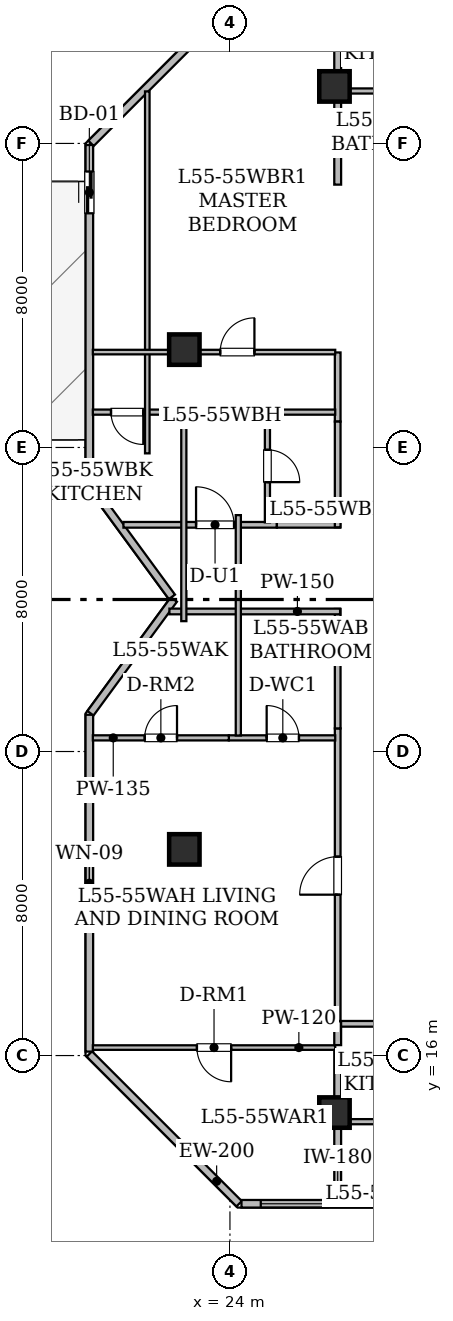
"""IFC4 building model, lengths in metres.
Left out: names, types, materials, properties, quantities, classifications, styles, units other than length and angle.
Written with IfcOpenShell. Run it as: python <this file> out.ifc"""

import sys

from ifc_helpers import new_model, si_unit, direction, frame, frame_2d, origin, origin_2d, place, context, subcontext, project, spatial, rectangle, hollow_rectangle, extrude, element, fill, save


model = new_model("IFC4")
c1 = context("Model", 3, precision=1e-05, world=origin(), true_north=direction((0.0, 1.0)))
c2 = subcontext(c1, "Body", "Model", "MODEL_VIEW")
j1 = project(units=[si_unit("LENGTHUNIT", "METRE"), si_unit("PLANEANGLEUNIT", "RADIAN")], contexts=[c1])
p1 = place(None, origin())
s1 = spatial("IfcSite", under=j1, at=p1, CompositionType="ELEMENT")
p2 = place(p1, origin())
s2 = spatial("IfcBuilding", under=s1, at=p2, CompositionType="ELEMENT")
p3 = place(p2, frame((0.0, 0.0, 217.2)))
s3 = spatial("IfcBuildingStorey", under=s2, at=p3, CompositionType="ELEMENT", Elevation=217.2)
for number, where, z_axis, x_axis in (
    (1, (26.75, 14.5, 0.025), (0.0, 0.0, 1.0), (1.0, 0.0, 0.0)),
    (2, (26.75, 41.5, 0.025), (0.0, 0.0, 1.0), (1.0, 0.0, 0.0)),
    (3, (22.8, 21.425, 0.025), (0.0, 0.0, 1.0), (1.0, 0.0, 0.0)),
    (4, (22.8, 34.575, 0.025), (0.0, 0.0, 1.0), (1.0, 0.0, 0.0)),
):
    element("IfcColumn", number, at=place(p3, frame(where, z_axis=z_axis, x_axis=x_axis)), inside=s3, PredefinedType="COLUMN", context=c2, shape_type="SweptSolid", body=[
        extrude(hollow_rectangle(XDim=0.8, YDim=0.8, WallThickness=0.04, at=origin_2d()), origin(), (0.0, 0.0, 1.0), 3.625),
    ])
p4 = place(p3, frame((24.241, 12.1, 0.0), z_axis=(0.0, 0.0, 1.0), x_axis=(-0.707106781187, 0.707106781187, 0.0)))
e5 = element("IfcWall", 5, at=p4, inside=s3, PredefinedType="STANDARD", context=c2, shape_type="SweptSolid", body=[
    extrude(rectangle(XDim=5.573, YDim=0.2, at=frame_2d((2.787, 0.0))), origin(), (0.0, 0.0, 1.0), 3.43),
])
p5 = place(p3, frame((20.3, 16.104, 0.0), z_axis=(0.0, 0.0, 1.0), x_axis=(0.0, 1.0, 0.0)))
e6 = element("IfcWall", 6, at=p5, inside=s3, PredefinedType="STANDARD", context=c2, shape_type="SweptSolid", body=[
    extrude(rectangle(XDim=8.863, YDim=0.2, at=frame_2d((4.432, 0.0))), origin(), (0.0, 0.0, 1.0), 3.43),
])
p6 = place(p5, frame((3.531, 0.0, 0.85)))
e7 = element("IfcOpeningElement", 7, at=p6, cuts=e6, PredefinedType="OPENING", context=c2, shape_type="SweptSolid", body=[
    extrude(rectangle(XDim=1.8, YDim=0.92, at=frame_2d((0.9, 0.46))), frame((0.0, 0.11, 0.0), z_axis=(0.0, -1.0, 0.0), x_axis=(1.0, 0.0, 0.0)), (0.0, 0.0, 1.0), 0.22),
])
p7 = place(p3, frame((20.329, 25.007, 0.0), z_axis=(0.0, 0.0, 1.0), x_axis=(0.591366515379, 0.806402904564, 0.0)))
e8 = element("IfcWall", 8, at=p7, inside=s3, PredefinedType="STANDARD", context=c2, shape_type="SweptSolid", body=[
    extrude(rectangle(XDim=3.711, YDim=0.2, at=frame_2d((1.856, 0.0))), origin(), (0.0, 0.0, 1.0), 3.43),
])
p8 = place(p3, frame((22.473, 28.069, 0.0), z_axis=(0.0, 0.0, 1.0), x_axis=(-0.591248456881, 0.80648946815, 0.0)))
e9 = element("IfcWall", 9, at=p8, inside=s3, PredefinedType="STANDARD", context=c2, shape_type="SweptSolid", body=[
    extrude(rectangle(XDim=3.675, YDim=0.2, at=frame_2d((1.837, 0.0))), origin(), (0.0, 0.0, 1.0), 3.43),
])
p9 = place(p3, frame((20.3, 31.084, 0.0), z_axis=(0.0, 0.0, 1.0), x_axis=(0.0, 1.0, 0.0)))
e10 = element("IfcWall", 10, at=p9, inside=s3, PredefinedType="STANDARD", context=c2, shape_type="SweptSolid", body=[
    extrude(rectangle(XDim=8.875, YDim=0.2, at=frame_2d((4.438, 0.0))), origin(), (0.0, 0.0, 1.0), 3.43),
])
p10 = place(p9, frame((7.077, 0.0, 0.0)))
e11 = element("IfcOpeningElement", 11, at=p10, cuts=e10, PredefinedType="OPENING", context=c2, shape_type="SweptSolid", body=[
    extrude(rectangle(XDim=1.1, YDim=2.2, at=frame_2d((0.55, 1.1))), frame((0.0, 0.11, 0.0), z_axis=(0.0, -1.0, 0.0), x_axis=(1.0, 0.0, 0.0)), (0.0, 0.0, 1.0), 0.22),
])
p11 = place(p3, frame((20.344, 40.003, 0.0), z_axis=(0.0, 0.0, 1.0), x_axis=(0.707106781187, 0.707106781187, 0.0)))
e12 = element("IfcWall", 12, at=p11, inside=s3, PredefinedType="STANDARD", context=c2, shape_type="SweptSolid", body=[
    extrude(rectangle(XDim=5.511, YDim=0.2, at=frame_2d((2.756, 0.0))), origin(), (0.0, 0.0, 1.0), 3.43),
])
p12 = place(p3, frame((65.696, 12.1, 0.0), z_axis=(0.0, 0.0, 1.0), x_axis=(-1.0, 0.0, 0.0)))
e13 = element("IfcWall", 13, at=p12, inside=s3, PredefinedType="STANDARD", context=c2, shape_type="SweptSolid", body=[
    extrude(rectangle(XDim=41.393, YDim=0.2, at=frame_2d((20.697, 0.0))), origin(), (0.0, 0.0, 1.0), 3.43),
])
p13 = place(p12, frame((39.085, 0.0, 0.85)))
e14 = element("IfcOpeningElement", 14, at=p13, cuts=e13, PredefinedType="OPENING", context=c2, shape_type="SweptSolid", body=[
    extrude(rectangle(XDim=1.8, YDim=0.92, at=frame_2d((0.9, 0.46))), frame((0.0, 0.11, 0.0), z_axis=(0.0, -1.0, 0.0), x_axis=(1.0, 0.0, 0.0)), (0.0, 0.0, 1.0), 0.22),
])
p14 = place(p12, frame((30.571, 0.0, 0.85)))
e15 = element("IfcOpeningElement", 15, at=p14, cuts=e13, PredefinedType="OPENING", context=c2, shape_type="SweptSolid", body=[
    extrude(rectangle(XDim=1.8, YDim=0.92, at=frame_2d((0.9, 0.46))), frame((0.0, 0.11, 0.0), z_axis=(0.0, -1.0, 0.0), x_axis=(1.0, 0.0, 0.0)), (0.0, 0.0, 1.0), 0.22),
])
p15 = place(p12, frame((25.264, 0.0, 0.85)))
e16 = element("IfcOpeningElement", 16, at=p15, cuts=e13, PredefinedType="OPENING", context=c2, shape_type="SweptSolid", body=[
    extrude(rectangle(XDim=1.8, YDim=0.92, at=frame_2d((0.9, 0.46))), frame((0.0, 0.11, 0.0), z_axis=(0.0, -1.0, 0.0), x_axis=(1.0, 0.0, 0.0)), (0.0, 0.0, 1.0), 0.22),
])
p16 = place(p12, frame((16.538, 0.0, 0.85)))
e17 = element("IfcOpeningElement", 17, at=p16, cuts=e13, PredefinedType="OPENING", context=c2, shape_type="SweptSolid", body=[
    extrude(rectangle(XDim=1.8, YDim=0.92, at=frame_2d((0.9, 0.46))), frame((0.0, 0.11, 0.0), z_axis=(0.0, -1.0, 0.0), x_axis=(1.0, 0.0, 0.0)), (0.0, 0.0, 1.0), 0.22),
])
p17 = place(p12, frame((4.105, 0.0, 0.85)))
e18 = element("IfcOpeningElement", 18, at=p17, cuts=e13, PredefinedType="OPENING", context=c2, shape_type="SweptSolid", body=[
    extrude(rectangle(XDim=1.8, YDim=0.92, at=frame_2d((0.9, 0.46))), frame((0.0, 0.11, 0.0), z_axis=(0.0, -1.0, 0.0), x_axis=(1.0, 0.0, 0.0)), (0.0, 0.0, 1.0), 0.22),
])
p18 = place(p3, frame((26.835, 16.9, 0.0), z_axis=(0.0, 0.0, 1.0), x_axis=(0.0, 1.0, 0.0)))
e19 = element("IfcWall", 19, at=p18, inside=s3, PredefinedType="STANDARD", context=c2, shape_type="SweptSolid", body=[
    extrude(rectangle(XDim=7.708, YDim=0.15, at=frame_2d((3.854, 0.0))), origin(), (0.0, 0.0, 1.0), 2.725),
])
p19 = place(p18, frame((3.333, 0.0, 0.0)))
e20 = element("IfcOpeningElement", 20, at=p19, cuts=e19, PredefinedType="OPENING", context=c2, shape_type="SweptSolid", body=[
    extrude(rectangle(XDim=1.0, YDim=2.15, at=frame_2d((0.5, 1.075))), frame((0.0, 0.085, 0.0), z_axis=(0.0, -1.0, 0.0), x_axis=(1.0, 0.0, 0.0)), (0.0, 0.0, 1.0), 0.17),
])
p20 = place(p3, frame((26.835, 24.608, 0.0), z_axis=(0.0, 0.0, 1.0), x_axis=(0.0, 1.0, 0.0)))
e21 = element("IfcWall", 21, at=p20, inside=s3, PredefinedType="STANDARD", context=c2, shape_type="SweptSolid", body=[
    extrude(rectangle(XDim=3.142, YDim=0.15, at=frame_2d((1.571, 0.0))), origin(), (0.0, 0.0, 1.0), 3.43),
])
p21 = place(p3, frame((26.898, 27.685, 0.0), z_axis=(0.0, 0.0, 1.0), x_axis=(-1.0, 0.0, 0.0)))
e22 = element("IfcWall", 22, at=p21, inside=s3, PredefinedType="STANDARD", context=c2, shape_type="SweptSolid", body=[
    extrude(rectangle(XDim=4.491, YDim=0.15, at=frame_2d((2.246, 0.0))), origin(), (0.0, 0.0, 1.0), 2.887),
])
p22 = place(p3, frame((21.197, 29.965, 0.0), z_axis=(0.0, 0.0, 1.0), x_axis=(1.0, 0.0, 0.0)))
e23 = element("IfcWall", 23, at=p22, inside=s3, PredefinedType="STANDARD", context=c2, shape_type="SweptSolid", body=[
    extrude(rectangle(XDim=4.038, YDim=0.15, at=frame_2d((2.019, 0.0))), origin(), (0.0, 0.0, 1.0), 2.887),
])
p23 = place(p22, frame((1.911, 0.0, 0.0)))
e24 = element("IfcOpeningElement", 24, at=p23, cuts=e23, PredefinedType="OPENING", context=c2, shape_type="SweptSolid", body=[
    extrude(rectangle(XDim=1.0, YDim=2.15, at=frame_2d((0.5, 1.075))), frame((0.0, 0.085, 0.0), z_axis=(0.0, -1.0, 0.0), x_axis=(1.0, 0.0, 0.0)), (0.0, 0.0, 1.0), 0.17),
])
p24 = place(p3, frame((26.835, 32.681, 0.0), z_axis=(0.0, 0.0, 1.0), x_axis=(0.0, 1.0, 0.0)))
e25 = element("IfcWall", 25, at=p24, inside=s3, PredefinedType="STANDARD", context=c2, shape_type="SweptSolid", body=[
    extrude(rectangle(XDim=1.819, YDim=0.15, at=frame_2d((0.91, 0.0))), origin(), (0.0, 0.0, 1.0), 3.065),
])
p25 = place(p3, frame((25.235, 29.965, 0.0), z_axis=(0.0, 0.0, 1.0), x_axis=(1.0, 0.0, 0.0)))
e26 = element("IfcWall", 26, at=p25, inside=s3, PredefinedType="STANDARD", context=c2, shape_type="SweptSolid", body=[
    extrude(rectangle(XDim=1.665, YDim=0.15, at=frame_2d((0.833, 0.0))), origin(), (0.0, 0.0, 1.0), 3.43),
])
p26 = place(p3, frame((26.835, 29.9, 0.0), z_axis=(0.0, 0.0, 1.0), x_axis=(0.0, 1.0, 0.0)))
e27 = element("IfcWall", 27, at=p26, inside=s3, PredefinedType="STANDARD", context=c2, shape_type="SweptSolid", body=[
    extrude(rectangle(XDim=2.781, YDim=0.15, at=frame_2d((1.391, 0.0))), origin(), (0.0, 0.0, 1.0), 3.43),
])
p27 = place(p3, frame((30.751, 16.835, 0.0), z_axis=(0.0, 0.0, 1.0), x_axis=(-1.0, 0.0, 0.0)))
e28 = element("IfcWall", 28, at=p27, inside=s3, PredefinedType="STANDARD", context=c2, shape_type="SweptSolid", body=[
    extrude(rectangle(XDim=3.851, YDim=0.15, at=frame_2d((1.926, 0.0))), origin(), (0.0, 0.0, 1.0), 2.725),
])
p28 = place(p3, frame((23.971, 24.359, 0.0), z_axis=(0.0, 0.0, 1.0), x_axis=(1.0, 0.0, 0.0)))
e29 = element("IfcWall", 29, at=p28, inside=s3, PredefinedType="PARTITIONING", context=c2, shape_type="SweptSolid", body=[
    extrude(rectangle(XDim=2.799, YDim=0.135, at=frame_2d((1.399, 0.0))), origin(), (0.0, 0.0, 1.0), 3.43),
])
p29 = place(p28, frame((0.995, 0.0, 0.0)))
e30 = element("IfcOpeningElement", 30, at=p29, cuts=e29, PredefinedType="OPENING", context=c2, shape_type="SweptSolid", body=[
    extrude(rectangle(XDim=0.85, YDim=2.1, at=frame_2d((0.425, 1.05))), frame((0.0, 0.077, 0.0), z_axis=(0.0, -1.0, 0.0), x_axis=(1.0, 0.0, 0.0)), (0.0, 0.0, 1.0), 0.155),
])
p30 = place(p3, frame((20.392, 24.359, 0.0), z_axis=(0.0, 0.0, 1.0), x_axis=(1.0, 0.0, 0.0)))
e31 = element("IfcWall", 31, at=p30, inside=s3, PredefinedType="PARTITIONING", context=c2, shape_type="SweptSolid", body=[
    extrude(rectangle(XDim=3.579, YDim=0.135, at=frame_2d((1.79, 0.0))), origin(), (0.0, 0.0, 1.0), 2.887),
])
p31 = place(p30, frame((1.365, 0.0, 0.0)))
e32 = element("IfcOpeningElement", 32, at=p31, cuts=e31, PredefinedType="OPENING", context=c2, shape_type="SweptSolid", body=[
    extrude(rectangle(XDim=0.85, YDim=2.1, at=frame_2d((0.425, 1.05))), frame((0.0, 0.077, 0.0), z_axis=(0.0, -1.0, 0.0), x_axis=(1.0, 0.0, 0.0)), (0.0, 0.0, 1.0), 0.155),
])
p32 = place(p3, frame((26.77, 16.21, 0.0), z_axis=(0.0, 0.0, 1.0), x_axis=(-1.0, 0.0, 0.0)))
e33 = element("IfcWall", 33, at=p32, inside=s3, PredefinedType="PARTITIONING", context=c2, shape_type="SweptSolid", body=[
    extrude(rectangle(XDim=6.378, YDim=0.12, at=frame_2d((3.189, 0.0))), origin(), (0.0, 0.0, 1.0), 2.887),
])
p33 = place(p32, frame((2.739, 0.0, 0.0)))
e34 = element("IfcOpeningElement", 34, at=p33, cuts=e33, PredefinedType="OPENING", context=c2, shape_type="SweptSolid", body=[
    extrude(rectangle(XDim=0.9, YDim=2.1, at=frame_2d((0.45, 1.05))), frame((0.0, 0.07, 0.0), z_axis=(0.0, -1.0, 0.0), x_axis=(1.0, 0.0, 0.0)), (0.0, 0.0, 1.0), 0.14),
])
p34 = place(p3, frame((26.835, 16.9, 0.0), z_axis=(0.0, 0.0, 1.0), x_axis=(0.0, -1.0, 0.0)))
e35 = element("IfcWall", 35, at=p34, inside=s3, PredefinedType="STANDARD", context=c2, shape_type="SweptSolid", body=[
    extrude(rectangle(XDim=0.625, YDim=0.18, at=frame_2d((0.312, 0.0))), origin(), (0.0, 0.0, 1.0), 3.43),
])
p35 = place(p3, frame((24.22, 24.421, 0.0), z_axis=(0.0, 0.0, 1.0), x_axis=(0.0, 1.0, 0.0)))
e36 = element("IfcWall", 36, at=p35, inside=s3, PredefinedType="PARTITIONING", context=c2, shape_type="SweptSolid", body=[
    extrude(rectangle(XDim=5.799, YDim=0.135, at=frame_2d((2.899, 0.0))), origin(), (0.0, 0.0, 1.0), 3.43),
])
p36 = place(p3, frame((26.835, 14.509, 0.0), z_axis=(0.0, 0.0, 1.0), x_axis=(0.0, -1.0, 0.0)))
e37 = element("IfcWall", 37, at=p36, inside=s3, PredefinedType="STANDARD", context=c2, shape_type="SweptSolid", body=[
    extrude(rectangle(XDim=2.317, YDim=0.18, at=frame_2d((1.159, 0.0))), origin(), (0.0, 0.0, 1.0), 2.725),
])
p37 = place(p3, frame((26.835, 16.145, 0.0), z_axis=(0.0, 0.0, 1.0), x_axis=(0.0, -1.0, 0.0)))
e38 = element("IfcWall", 38, at=p37, inside=s3, PredefinedType="STANDARD", context=c2, shape_type="SweptSolid", body=[
    extrude(rectangle(XDim=1.636, YDim=0.18, at=frame_2d((0.818, 0.0))), origin(), (0.0, 0.0, 1.0), 2.725),
])
p38 = place(p3, frame((26.77, 32.93, 0.0), z_axis=(0.0, 0.0, 1.0), x_axis=(-1.0, 0.0, 0.0)))
e39 = element("IfcWall", 39, at=p38, inside=s3, PredefinedType="PARTITIONING", context=c2, shape_type="SweptSolid", body=[
    extrude(rectangle(XDim=1.849, YDim=0.135, at=frame_2d((0.925, 0.0))), origin(), (0.0, 0.0, 1.0), 3.43),
])
p39 = place(p3, frame((24.986, 32.995, 0.0), z_axis=(0.0, 0.0, 1.0), x_axis=(0.0, -1.0, 0.0)))
e40 = element("IfcWall", 40, at=p39, inside=s3, PredefinedType="PARTITIONING", context=c2, shape_type="SweptSolid", body=[
    extrude(rectangle(XDim=2.965, YDim=0.135, at=frame_2d((1.482, 0.0))), origin(), (0.0, 0.0, 1.0), 3.43),
])
p40 = place(p39, frame((1.057, 0.0, 0.0)))
e41 = element("IfcOpeningElement", 41, at=p40, cuts=e40, PredefinedType="OPENING", context=c2, shape_type="SweptSolid", body=[
    extrude(rectangle(XDim=0.85, YDim=2.1, at=frame_2d((0.425, 1.05))), frame((0.0, 0.077, 0.0), z_axis=(0.0, -1.0, 0.0), x_axis=(1.0, 0.0, 0.0)), (0.0, 0.0, 1.0), 0.155),
])
p41 = place(p3, frame((22.786, 27.43, 0.0), z_axis=(0.0, 0.0, 1.0), x_axis=(0.0, 1.0, 0.0)))
e42 = element("IfcWall", 42, at=p41, inside=s3, PredefinedType="PARTITIONING", context=c2, shape_type="SweptSolid", body=[
    extrude(rectangle(XDim=5.565, YDim=0.135, at=frame_2d((2.783, 0.0))), origin(), (0.0, 0.0, 1.0), 2.887),
])
p42 = place(p3, frame((22.851, 32.93, 0.0), z_axis=(0.0, 0.0, 1.0), x_axis=(-1.0, 0.0, 0.0)))
e43 = element("IfcWall", 43, at=p42, inside=s3, PredefinedType="PARTITIONING", context=c2, shape_type="SweptSolid", body=[
    extrude(rectangle(XDim=2.459, YDim=0.135, at=frame_2d((1.229, 0.0))), origin(), (0.0, 0.0, 1.0), 2.887),
])
p43 = place(p42, frame((1.131, 0.0, 0.0)))
e44 = element("IfcOpeningElement", 44, at=p43, cuts=e43, PredefinedType="OPENING", context=c2, shape_type="SweptSolid", body=[
    extrude(rectangle(XDim=0.85, YDim=2.1, at=frame_2d((0.425, 1.05))), frame((0.0, 0.077, 0.0), z_axis=(0.0, -1.0, 0.0), x_axis=(1.0, 0.0, 0.0)), (0.0, 0.0, 1.0), 0.155),
])
p44 = place(p3, frame((21.825, 41.369, 0.0), z_axis=(0.0, 0.0, 1.0), x_axis=(0.0, -1.0, 0.0)))
e45 = element("IfcWall", 45, at=p44, inside=s3, PredefinedType="PARTITIONING", context=c2, shape_type="SweptSolid", body=[
    extrude(rectangle(XDim=9.524, YDim=0.12, at=frame_2d((4.762, 0.0))), origin(), (0.0, 0.0, 1.0), 3.43),
])
p45 = place(p3, frame((20.392, 34.51, 0.0), z_axis=(0.0, 0.0, 1.0), x_axis=(1.0, 0.0, 0.0)))
e46 = element("IfcWall", 46, at=p45, inside=s3, PredefinedType="PARTITIONING", context=c2, shape_type="SweptSolid", body=[
    extrude(rectangle(XDim=6.378, YDim=0.12, at=frame_2d((3.189, 0.0))), origin(), (0.0, 0.0, 1.0), 2.725),
])
p46 = place(p45, frame((3.352, 0.0, 0.0)))
e47 = element("IfcOpeningElement", 47, at=p46, cuts=e46, PredefinedType="OPENING", context=c2, shape_type="SweptSolid", body=[
    extrude(rectangle(XDim=0.9, YDim=2.1, at=frame_2d((0.45, 1.05))), frame((0.0, 0.07, 0.0), z_axis=(0.0, -1.0, 0.0), x_axis=(1.0, 0.0, 0.0)), (0.0, 0.0, 1.0), 0.14),
])
p47 = place(p3, frame((26.835, 41.629, 0.0), z_axis=(0.0, 0.0, 1.0), x_axis=(0.0, -1.0, 0.0)))
e48 = element("IfcWall", 48, at=p47, inside=s3, PredefinedType="STANDARD", context=c2, shape_type="SweptSolid", body=[
    extrude(rectangle(XDim=2.713, YDim=0.18, at=frame_2d((1.356, 0.0))), origin(), (0.0, 0.0, 1.0), 2.725),
])
p48 = place(p3, frame((26.835, 43.808, 0.0), z_axis=(0.0, 0.0, 1.0), x_axis=(0.0, -1.0, 0.0)))
e49 = element("IfcWall", 49, at=p48, inside=s3, PredefinedType="STANDARD", context=c2, shape_type="SweptSolid", body=[
    extrude(rectangle(XDim=2.179, YDim=0.18, at=frame_2d((1.09, 0.0))), origin(), (0.0, 0.0, 1.0), 2.725),
])
p49 = place(p3, frame((26.917, 14.26, 0.0), z_axis=(0.0, 0.0, 1.0), x_axis=(1.0, 0.0, 0.0)))
e50 = element("IfcWall", 50, at=p49, inside=s3, PredefinedType="PARTITIONING", context=c2, shape_type="SweptSolid", body=[
    extrude(rectangle(XDim=4.022, YDim=0.135, at=frame_2d((2.011, 0.0))), origin(), (0.0, 0.0, 1.0), 2.887),
])
p50 = place(p3, frame((26.917, 41.38, 0.0), z_axis=(0.0, 0.0, 1.0), x_axis=(1.0, 0.0, 0.0)))
e51 = element("IfcWall", 51, at=p50, inside=s3, PredefinedType="PARTITIONING", context=c2, shape_type="SweptSolid", body=[
    extrude(rectangle(XDim=4.022, YDim=0.135, at=frame_2d((2.011, 0.0))), origin(), (0.0, 0.0, 1.0), 2.725),
])
p51 = place(p10, origin())
e52 = element("IfcDoor", 52, at=p51, inside=s3, OperationType="SLIDING_TO_LEFT", PredefinedType="DOOR", context=c2, shape_type="SweptSolid", body=[
    extrude(rectangle(XDim=1.1, YDim=2.2, at=frame_2d((0.55, 1.1))), frame((0.0, 0.025, 0.0), z_axis=(0.0, -1.0, 0.0), x_axis=(1.0, 0.0, 0.0)), (0.0, 0.0, 1.0), 0.05),
])
fill(e11, e52)
p52 = place(p6, origin())
e53 = element("IfcWindow", 53, at=p52, inside=s3, PartitioningType="SINGLE_PANEL", PredefinedType="WINDOW", context=c2, shape_type="SweptSolid", body=[
    extrude(rectangle(XDim=1.8, YDim=0.92, at=frame_2d((0.9, 0.46))), frame((0.0, 0.03, 0.0), z_axis=(0.0, -1.0, 0.0), x_axis=(1.0, 0.0, 0.0)), (0.0, 0.0, 1.0), 0.06),
])
fill(e7, e53)
p53 = place(p13, origin())
e54 = element("IfcWindow", 54, at=p53, inside=s3, PartitioningType="SINGLE_PANEL", PredefinedType="WINDOW", context=c2, shape_type="SweptSolid", body=[
    extrude(rectangle(XDim=1.8, YDim=0.92, at=frame_2d((0.9, 0.46))), frame((0.0, 0.03, 0.0), z_axis=(0.0, -1.0, 0.0), x_axis=(1.0, 0.0, 0.0)), (0.0, 0.0, 1.0), 0.06),
])
fill(e14, e54)
p54 = place(p19, origin())
e55 = element("IfcDoor", 55, at=p54, inside=s3, OperationType="SINGLE_SWING_LEFT", PredefinedType="DOOR", context=c2, shape_type="SweptSolid", body=[
    extrude(rectangle(XDim=1.0, YDim=2.15, at=frame_2d((0.5, 1.075))), frame((0.0, 0.025, 0.0), z_axis=(0.0, -1.0, 0.0), x_axis=(1.0, 0.0, 0.0)), (0.0, 0.0, 1.0), 0.05),
])
fill(e20, e55)
p55 = place(p23, origin())
e56 = element("IfcDoor", 56, at=p55, inside=s3, OperationType="SINGLE_SWING_LEFT", PredefinedType="DOOR", context=c2, shape_type="SweptSolid", body=[
    extrude(rectangle(XDim=1.0, YDim=2.15, at=frame_2d((0.5, 1.075))), frame((0.0, 0.025, 0.0), z_axis=(0.0, -1.0, 0.0), x_axis=(1.0, 0.0, 0.0)), (0.0, 0.0, 1.0), 0.05),
])
fill(e24, e56)
p56 = place(p29, origin())
e57 = element("IfcDoor", 57, at=p56, inside=s3, OperationType="SINGLE_SWING_LEFT", PredefinedType="DOOR", context=c2, shape_type="SweptSolid", body=[
    extrude(rectangle(XDim=0.85, YDim=2.1, at=frame_2d((0.425, 1.05))), frame((0.0, 0.025, 0.0), z_axis=(0.0, -1.0, 0.0), x_axis=(1.0, 0.0, 0.0)), (0.0, 0.0, 1.0), 0.05),
])
fill(e30, e57)
p57 = place(p31, origin())
e58 = element("IfcDoor", 58, at=p57, inside=s3, OperationType="SINGLE_SWING_RIGHT", PredefinedType="DOOR", context=c2, shape_type="SweptSolid", body=[
    extrude(rectangle(XDim=0.85, YDim=2.1, at=frame_2d((0.425, 1.05))), frame((0.0, 0.025, 0.0), z_axis=(0.0, -1.0, 0.0), x_axis=(1.0, 0.0, 0.0)), (0.0, 0.0, 1.0), 0.05),
])
fill(e32, e58)
p58 = place(p33, origin())
e59 = element("IfcDoor", 59, at=p58, inside=s3, OperationType="SINGLE_SWING_LEFT", PredefinedType="DOOR", context=c2, shape_type="SweptSolid", body=[
    extrude(rectangle(XDim=0.9, YDim=2.1, at=frame_2d((0.45, 1.05))), frame((0.0, 0.025, 0.0), z_axis=(0.0, -1.0, 0.0), x_axis=(1.0, 0.0, 0.0)), (0.0, 0.0, 1.0), 0.05),
])
fill(e34, e59)
p59 = place(p40, origin())
e60 = element("IfcDoor", 60, at=p59, inside=s3, OperationType="SINGLE_SWING_RIGHT", PredefinedType="DOOR", context=c2, shape_type="SweptSolid", body=[
    extrude(rectangle(XDim=0.85, YDim=2.1, at=frame_2d((0.425, 1.05))), frame((0.0, 0.025, 0.0), z_axis=(0.0, -1.0, 0.0), x_axis=(1.0, 0.0, 0.0)), (0.0, 0.0, 1.0), 0.05),
])
fill(e41, e60)
p60 = place(p43, origin())
e61 = element("IfcDoor", 61, at=p60, inside=s3, OperationType="SINGLE_SWING_LEFT", PredefinedType="DOOR", context=c2, shape_type="SweptSolid", body=[
    extrude(rectangle(XDim=0.85, YDim=2.1, at=frame_2d((0.425, 1.05))), frame((0.0, 0.025, 0.0), z_axis=(0.0, -1.0, 0.0), x_axis=(1.0, 0.0, 0.0)), (0.0, 0.0, 1.0), 0.05),
])
fill(e44, e61)
p61 = place(p46, origin())
e62 = element("IfcDoor", 62, at=p61, inside=s3, OperationType="SINGLE_SWING_RIGHT", PredefinedType="DOOR", context=c2, shape_type="SweptSolid", body=[
    extrude(rectangle(XDim=0.9, YDim=2.1, at=frame_2d((0.45, 1.05))), frame((0.0, 0.025, 0.0), z_axis=(0.0, -1.0, 0.0), x_axis=(1.0, 0.0, 0.0)), (0.0, 0.0, 1.0), 0.05),
])
fill(e47, e62)
save(model, sys.argv[1])
